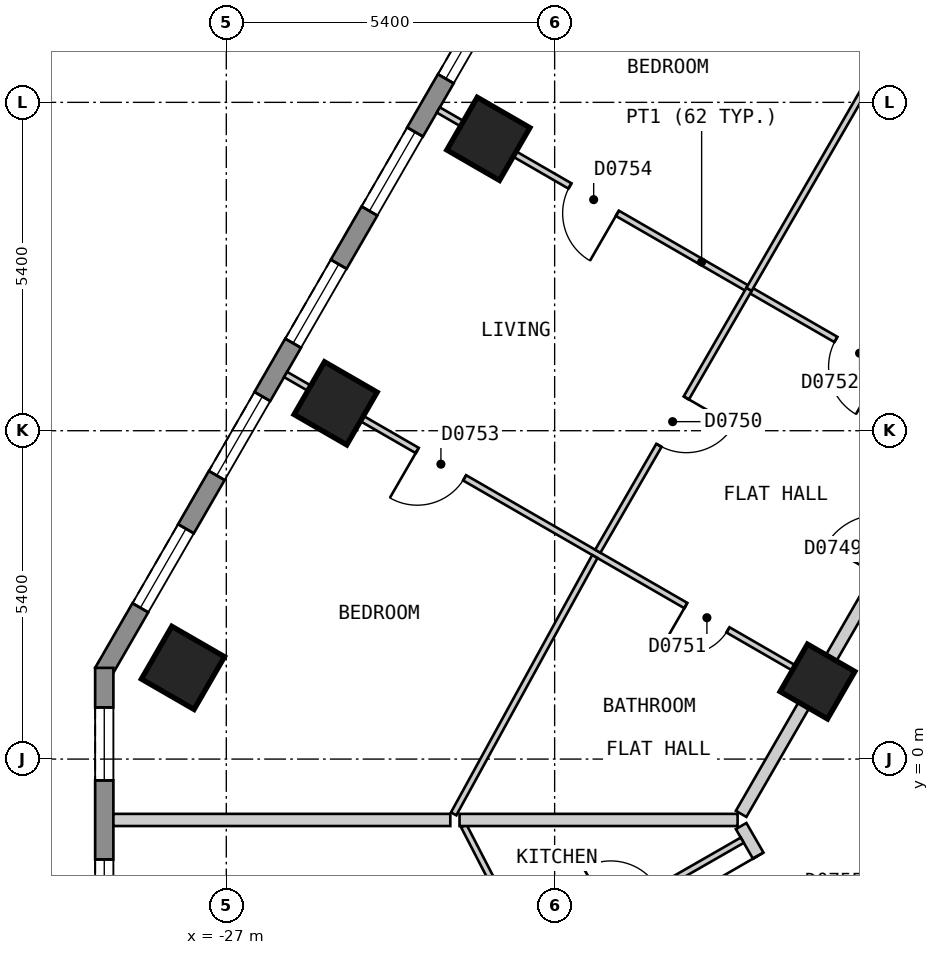
"""IFC4 building model, lengths in metres.
Left out: names, types, materials, properties, quantities, classifications, styles, units other than length and angle.
Written with IfcOpenShell. Run it as: python <this file> out.ifc"""

import sys

from ifc_helpers import new_model, si_unit, direction, frame, frame_2d, origin, origin_2d, place, context, subcontext, project, spatial, polyline, rectangle, outline, extrude, element, fill, save


model = new_model("IFC4")
c1 = context("Model", 3, precision=1e-05, world=origin(), true_north=direction((0.0, 1.0)))
c2 = subcontext(c1, "Body", "Model", "MODEL_VIEW")
j1 = project(units=[si_unit("LENGTHUNIT", "METRE"), si_unit("PLANEANGLEUNIT", "RADIAN")], contexts=[c1])
p1 = place(None, origin())
s1 = spatial("IfcSite", under=j1, at=p1, CompositionType="ELEMENT")
p2 = place(p1, origin())
s2 = spatial("IfcBuilding", under=s1, at=p2, CompositionType="ELEMENT")
p3 = place(p2, frame((0.0, 0.0, 105.0)))
s3 = spatial("IfcBuildingStorey", under=s2, at=p3, CompositionType="ELEMENT", Elevation=105.0)
for number, where, z_axis, x_axis in (
    (1, (-22.69, 10.2, 0.0), (0.0, 0.0, 1.0), (-0.5, -0.866, 0.0)),
    (2, (-25.202, 5.85, 0.0), (0.0, 0.0, 1.0), (-0.5, -0.866, 0.0)),
    (3, (-27.713, 1.5, 0.0), (0.0, 0.0, 1.0), (-0.5, -0.866, 0.0)),
):
    element("IfcColumn", number, at=place(p3, frame(where, z_axis=z_axis, x_axis=x_axis)), inside=s3, PredefinedType="COLUMN", context=c2, shape_type="SweptSolid", body=[
        extrude(rectangle(XDim=1.0, YDim=1.0, at=origin_2d()), origin(), (0.0, 0.0, 1.0), 3.0),
    ])
p4 = place(p3, frame((-17.277, 1.275, 0.0), z_axis=(0.0, 0.0, 1.0), x_axis=(-0.5, -0.866025403784, 0.0)))
e4 = element("IfcColumn", 4, at=p4, inside=s3, PredefinedType="COLUMN", context=c2, shape_type="SweptSolid", body=[
    extrude(rectangle(XDim=0.9, YDim=0.9, at=origin_2d()), origin(), (0.0, 0.0, 1.0), 3.0),
])
p5 = place(p3, frame((-15.747, 24.425, 0.0), z_axis=(0.0, 0.0, 1.0), x_axis=(-0.500027479704, -0.866009537788, 0.0)))
e5 = element("IfcWall", 5, at=p5, inside=s3, PredefinedType="SOLIDWALL", context=c2, shape_type="SweptSolid", body=[
    extrude(outline(polyline([(0.0, -0.15), (26.559, -0.15), (26.478, 0.15), (0.08, 0.15), (0.0, -0.15)])), origin(), (0.0, 0.0, 1.0), 2.6),
])
p6 = place(p5, frame((1.227, 0.0, 0.15)))
e6 = element("IfcOpeningElement", 6, at=p6, cuts=e5, PredefinedType="OPENING", context=c2, shape_type="SweptSolid", body=[
    extrude(rectangle(XDim=1.5, YDim=2.1, at=frame_2d((0.75, 1.05))), frame((0.0, 0.16, 0.0), z_axis=(0.0, -1.0, 0.0), x_axis=(1.0, 0.0, 0.0)), (0.0, 0.0, 1.0), 0.32),
])
p7 = place(p5, frame((3.739, 0.0, 0.15)))
e7 = element("IfcOpeningElement", 7, at=p7, cuts=e5, PredefinedType="OPENING", context=c2, shape_type="SweptSolid", body=[
    extrude(rectangle(XDim=1.5, YDim=2.1, at=frame_2d((0.75, 1.05))), frame((0.0, 0.16, 0.0), z_axis=(0.0, -1.0, 0.0), x_axis=(1.0, 0.0, 0.0)), (0.0, 0.0, 1.0), 0.32),
])
p8 = place(p5, frame((6.25, 0.0, 0.15)))
e8 = element("IfcOpeningElement", 8, at=p8, cuts=e5, PredefinedType="OPENING", context=c2, shape_type="SweptSolid", body=[
    extrude(rectangle(XDim=1.5, YDim=2.1, at=frame_2d((0.75, 1.05))), frame((0.0, 0.16, 0.0), z_axis=(0.0, -1.0, 0.0), x_axis=(1.0, 0.0, 0.0)), (0.0, 0.0, 1.0), 0.32),
])
p9 = place(p5, frame((8.761, 0.0, 0.15)))
e9 = element("IfcOpeningElement", 9, at=p9, cuts=e5, PredefinedType="OPENING", context=c2, shape_type="SweptSolid", body=[
    extrude(rectangle(XDim=1.5, YDim=2.1, at=frame_2d((0.75, 1.05))), frame((0.0, 0.16, 0.0), z_axis=(0.0, -1.0, 0.0), x_axis=(1.0, 0.0, 0.0)), (0.0, 0.0, 1.0), 0.32),
])
p10 = place(p5, frame((11.273, 0.0, 0.15)))
e10 = element("IfcOpeningElement", 10, at=p10, cuts=e5, PredefinedType="OPENING", context=c2, shape_type="SweptSolid", body=[
    extrude(rectangle(XDim=1.5, YDim=2.1, at=frame_2d((0.75, 1.05))), frame((0.0, 0.16, 0.0), z_axis=(0.0, -1.0, 0.0), x_axis=(1.0, 0.0, 0.0)), (0.0, 0.0, 1.0), 0.32),
])
p11 = place(p5, frame((13.785, 0.0, 0.15)))
e11 = element("IfcOpeningElement", 11, at=p11, cuts=e5, PredefinedType="OPENING", context=c2, shape_type="SweptSolid", body=[
    extrude(rectangle(XDim=1.5, YDim=2.1, at=frame_2d((0.75, 1.05))), frame((0.0, 0.16, 0.0), z_axis=(0.0, -1.0, 0.0), x_axis=(1.0, 0.0, 0.0)), (0.0, 0.0, 1.0), 0.32),
])
p12 = place(p5, frame((16.296, 0.0, 0.15)))
e12 = element("IfcOpeningElement", 12, at=p12, cuts=e5, PredefinedType="OPENING", context=c2, shape_type="SweptSolid", body=[
    extrude(rectangle(XDim=1.5, YDim=2.1, at=frame_2d((0.75, 1.05))), frame((0.0, 0.16, 0.0), z_axis=(0.0, -1.0, 0.0), x_axis=(1.0, 0.0, 0.0)), (0.0, 0.0, 1.0), 0.32),
])
p13 = place(p5, frame((18.807, 0.0, 0.15)))
e13 = element("IfcOpeningElement", 13, at=p13, cuts=e5, PredefinedType="OPENING", context=c2, shape_type="SweptSolid", body=[
    extrude(rectangle(XDim=1.5, YDim=2.1, at=frame_2d((0.75, 1.05))), frame((0.0, 0.16, 0.0), z_axis=(0.0, -1.0, 0.0), x_axis=(1.0, 0.0, 0.0)), (0.0, 0.0, 1.0), 0.32),
])
p14 = place(p5, frame((21.319, 0.0, 0.15)))
e14 = element("IfcOpeningElement", 14, at=p14, cuts=e5, PredefinedType="OPENING", context=c2, shape_type="SweptSolid", body=[
    extrude(rectangle(XDim=1.5, YDim=2.1, at=frame_2d((0.75, 1.05))), frame((0.0, 0.16, 0.0), z_axis=(0.0, -1.0, 0.0), x_axis=(1.0, 0.0, 0.0)), (0.0, 0.0, 1.0), 0.32),
])
p15 = place(p5, frame((23.831, 0.0, 0.15)))
e15 = element("IfcOpeningElement", 15, at=p15, cuts=e5, PredefinedType="OPENING", context=c2, shape_type="SweptSolid", body=[
    extrude(rectangle(XDim=1.5, YDim=2.1, at=frame_2d((0.75, 1.05))), frame((0.0, 0.16, 0.0), z_axis=(0.0, -1.0, 0.0), x_axis=(1.0, 0.0, 0.0)), (0.0, 0.0, 1.0), 0.32),
])
p16 = place(p3, frame((-29.007, 1.5, 0.0), z_axis=(0.0, 0.0, 1.0), x_axis=(0.0, -1.0, 0.0)))
e16 = element("IfcWall", 16, at=p16, inside=s3, PredefinedType="SOLIDWALL", context=c2, shape_type="SweptSolid", body=[
    extrude(outline(polyline([(0.0, -0.15), (5.0, -0.15), (4.92, 0.15), (0.08, 0.15), (0.0, -0.15)])), origin(), (0.0, 0.0, 1.0), 2.6),
])
p17 = place(p16, frame((0.65, 0.0, 0.15)))
e17 = element("IfcOpeningElement", 17, at=p17, cuts=e16, PredefinedType="OPENING", context=c2, shape_type="SweptSolid", body=[
    extrude(rectangle(XDim=1.2, YDim=2.1, at=frame_2d((0.6, 1.05))), frame((0.0, 0.16, 0.0), z_axis=(0.0, -1.0, 0.0), x_axis=(1.0, 0.0, 0.0)), (0.0, 0.0, 1.0), 0.32),
])
p18 = place(p16, frame((3.15, 0.0, 0.15)))
e18 = element("IfcOpeningElement", 18, at=p18, cuts=e16, PredefinedType="OPENING", context=c2, shape_type="SweptSolid", body=[
    extrude(rectangle(XDim=1.2, YDim=2.1, at=frame_2d((0.6, 1.05))), frame((0.0, 0.16, 0.0), z_axis=(0.0, -1.0, 0.0), x_axis=(1.0, 0.0, 0.0)), (0.0, 0.0, 1.0), 0.32),
])
p19 = place(p3, frame((-18.533, -1.101, 0.0), z_axis=(0.0, 0.0, 1.0), x_axis=(0.500135180047, -0.865947343479, 0.0)))
e19 = element("IfcWall", 19, at=p19, inside=s3, PredefinedType="PARTITIONING", context=c2, shape_type="SweptSolid", body=[
    extrude(rectangle(XDim=2.799, YDim=0.2, at=frame_2d((1.399, 0.0))), origin(), (0.0, 0.0, 1.0), 2.6),
])
p20 = place(p19, frame((0.562, 0.0, 0.0)))
e20 = element("IfcOpeningElement", 20, at=p20, cuts=e19, PredefinedType="OPENING", context=c2, shape_type="SweptSolid", body=[
    extrude(rectangle(XDim=1.0, YDim=2.1, at=frame_2d((0.5, 1.05))), frame((0.0, 0.11, 0.0), z_axis=(0.0, -1.0, 0.0), x_axis=(1.0, 0.0, 0.0)), (0.0, 0.0, 1.0), 0.22),
])
p21 = place(p3, frame((-18.533, -0.901, 0.0), z_axis=(0.0, 0.0, 1.0), x_axis=(0.499981198768, 0.866036258409, 0.0)))
e21 = element("IfcWall", 21, at=p21, inside=s3, PredefinedType="PARTITIONING", context=c2, shape_type="SweptSolid", body=[
    extrude(rectangle(XDim=20.093, YDim=0.2, at=frame_2d((10.046, 0.0))), origin(), (0.0, 0.0, 1.0), 2.6),
])
p22 = place(p21, frame((14.57, 0.0, 0.0)))
e22 = element("IfcOpeningElement", 22, at=p22, cuts=e21, PredefinedType="OPENING", context=c2, shape_type="SweptSolid", body=[
    extrude(rectangle(XDim=1.0, YDim=2.1, at=frame_2d((0.5, 1.05))), frame((0.0, 0.11, 0.0), z_axis=(0.0, -1.0, 0.0), x_axis=(1.0, 0.0, 0.0)), (0.0, 0.0, 1.0), 0.22),
])
p23 = place(p21, frame((4.523, 0.0, 0.0)))
e23 = element("IfcOpeningElement", 23, at=p23, cuts=e21, PredefinedType="OPENING", context=c2, shape_type="SweptSolid", body=[
    extrude(rectangle(XDim=1.0, YDim=2.1, at=frame_2d((0.5, 1.05))), frame((0.0, 0.11, 0.0), z_axis=(0.0, -1.0, 0.0), x_axis=(1.0, 0.0, 0.0)), (0.0, 0.0, 1.0), 0.22),
])
p24 = place(p3, frame((-23.093, -1.101, 0.0), z_axis=(0.0, 0.0, 1.0), x_axis=(0.459171814268, -0.888347479865, 0.0)))
e24 = element("IfcWall", 24, at=p24, inside=s3, PredefinedType="PARTITIONING", context=c2, shape_type="SweptSolid", body=[
    extrude(rectangle(XDim=2.01, YDim=0.1, at=frame_2d((1.005, 0.0))), origin(), (0.0, 0.0, 1.0), 2.6),
])
p25 = place(p3, frame((-26.025, 6.325, 0.0), z_axis=(0.0, 0.0, 1.0), x_axis=(0.866041268327, -0.499972520799, 0.0)))
e25 = element("IfcWall", 25, at=p25, inside=s3, PredefinedType="PARTITIONING", context=c2, shape_type="SweptSolid", body=[
    extrude(rectangle(XDim=10.0, YDim=0.1, at=frame_2d((5.0, 0.0))), origin(), (0.0, 0.0, 1.0), 2.6),
])
p26 = place(p25, frame((7.601, 0.0, 0.0)))
e26 = element("IfcOpeningElement", 26, at=p26, cuts=e25, PredefinedType="OPENING", context=c2, shape_type="SweptSolid", body=[
    extrude(rectangle(XDim=0.8, YDim=2.1, at=frame_2d((0.4, 1.05))), frame((0.0, 0.06, 0.0), z_axis=(0.0, -1.0, 0.0), x_axis=(1.0, 0.0, 0.0)), (0.0, 0.0, 1.0), 0.12),
])
p27 = place(p25, frame((2.5, 0.0, 0.0)))
e27 = element("IfcOpeningElement", 27, at=p27, cuts=e25, PredefinedType="OPENING", context=c2, shape_type="SweptSolid", body=[
    extrude(rectangle(XDim=0.9, YDim=2.1, at=frame_2d((0.45, 1.05))), frame((0.0, 0.06, 0.0), z_axis=(0.0, -1.0, 0.0), x_axis=(1.0, 0.0, 0.0)), (0.0, 0.0, 1.0), 0.12),
])
p28 = place(p3, frame((-23.513, 10.675, 0.0), z_axis=(0.0, 0.0, 1.0), x_axis=(0.866041268327, -0.499972520799, 0.0)))
e28 = element("IfcWall", 28, at=p28, inside=s3, PredefinedType="PARTITIONING", context=c2, shape_type="SweptSolid", body=[
    extrude(rectangle(XDim=10.0, YDim=0.1, at=frame_2d((5.0, 0.0))), origin(), (0.0, 0.0, 1.0), 2.6),
])
p29 = place(p28, frame((7.55, 0.0, 0.0)))
e29 = element("IfcOpeningElement", 29, at=p29, cuts=e28, PredefinedType="OPENING", context=c2, shape_type="SweptSolid", body=[
    extrude(rectangle(XDim=0.9, YDim=2.1, at=frame_2d((0.45, 1.05))), frame((0.0, 0.06, 0.0), z_axis=(0.0, -1.0, 0.0), x_axis=(1.0, 0.0, 0.0)), (0.0, 0.0, 1.0), 0.12),
])
p30 = place(p28, frame((2.5, 0.0, 0.0)))
e30 = element("IfcOpeningElement", 30, at=p30, cuts=e28, PredefinedType="OPENING", context=c2, shape_type="SweptSolid", body=[
    extrude(rectangle(XDim=0.9, YDim=2.1, at=frame_2d((0.45, 1.05))), frame((0.0, 0.06, 0.0), z_axis=(0.0, -1.0, 0.0), x_axis=(1.0, 0.0, 0.0)), (0.0, 0.0, 1.0), 0.12),
])
p31 = place(p3, frame((-20.89, 3.418, 0.0), z_axis=(0.0, 0.0, 1.0), x_axis=(0.500014231302, 0.866017187182, 0.0)))
e31 = element("IfcWall", 31, at=p31, inside=s3, PredefinedType="PARTITIONING", context=c2, shape_type="SweptSolid", body=[
    extrude(rectangle(XDim=4.973, YDim=0.1, at=frame_2d((2.487, 0.0))), origin(), (0.0, 0.0, 1.0), 2.6),
])
p32 = place(p31, frame((2.011, 0.0, 0.0)))
e32 = element("IfcOpeningElement", 32, at=p32, cuts=e31, PredefinedType="OPENING", context=c2, shape_type="SweptSolid", body=[
    extrude(rectangle(XDim=0.9, YDim=2.1, at=frame_2d((0.45, 1.05))), frame((0.0, 0.06, 0.0), z_axis=(0.0, -1.0, 0.0), x_axis=(1.0, 0.0, 0.0)), (0.0, 0.0, 1.0), 0.12),
])
p33 = place(p3, frame((-23.261, -0.901, 0.0), z_axis=(0.0, 0.0, 1.0), x_axis=(0.481037050261, 0.876700265927, 0.0)))
e33 = element("IfcWall", 33, at=p33, inside=s3, PredefinedType="PARTITIONING", context=c2, shape_type="SweptSolid", body=[
    extrude(rectangle(XDim=4.827, YDim=0.1, at=frame_2d((2.414, 0.0))), origin(), (0.0, 0.0, 1.0), 2.6),
])
p34 = place(p3, frame((-22.094, -3.388, 0.0), z_axis=(0.0, 0.0, 1.0), x_axis=(0.867386440944, 0.497635169644, 0.0)))
e34 = element("IfcWall", 34, at=p34, inside=s3, PredefinedType="PARTITIONING", context=c2, shape_type="SweptSolid", body=[
    extrude(rectangle(XDim=4.127, YDim=0.1, at=frame_2d((2.064, 0.0))), origin(), (0.0, 0.0, 1.0), 2.6),
])
p35 = place(p34, frame((1.634, 0.0, 0.0)))
e35 = element("IfcOpeningElement", 35, at=p35, cuts=e34, PredefinedType="OPENING", context=c2, shape_type="SweptSolid", body=[
    extrude(rectangle(XDim=0.9, YDim=2.1, at=frame_2d((0.45, 1.05))), frame((0.0, 0.06, 0.0), z_axis=(0.0, -1.0, 0.0), x_axis=(1.0, 0.0, 0.0)), (0.0, 0.0, 1.0), 0.12),
])
p36 = place(p3, frame((-28.857, -1.001, 0.0), z_axis=(0.0, 0.0, 1.0), x_axis=(1.0, 0.0, 0.0)))
e36 = element("IfcWall", 36, at=p36, inside=s3, PredefinedType="PARTITIONING", context=c2, shape_type="SweptSolid", body=[
    extrude(rectangle(XDim=5.541, YDim=0.2, at=frame_2d((2.771, 0.0))), origin(), (0.0, 0.0, 1.0), 2.6),
])
p37 = place(p3, frame((-23.164, -1.001, 0.0), z_axis=(0.0, 0.0, 1.0), x_axis=(1.0, 0.0, 0.0)))
e37 = element("IfcWall", 37, at=p37, inside=s3, PredefinedType="PARTITIONING", context=c2, shape_type="SweptSolid", body=[
    extrude(rectangle(XDim=4.573, YDim=0.2, at=frame_2d((2.287, 0.0))), origin(), (0.0, 0.0, 1.0), 2.6),
])
p38 = place(p3, frame((-18.403, 7.725, 0.0), z_axis=(0.0, 0.0, 1.0), x_axis=(0.499995794706, 0.866027831699, 0.0)))
e38 = element("IfcWall", 38, at=p38, inside=s3, PredefinedType="PARTITIONING", context=c2, shape_type="SweptSolid", body=[
    extrude(rectangle(XDim=4.922, YDim=0.1, at=frame_2d((2.461, 0.0))), origin(), (0.0, 0.0, 1.0), 2.6),
])
p39 = place(p11, origin())
e39 = element("IfcWindow", 39, at=p39, inside=s3, PartitioningType="SINGLE_PANEL", PredefinedType="WINDOW", context=c2, shape_type="SweptSolid", body=[
    extrude(rectangle(XDim=1.5, YDim=2.1, at=frame_2d((0.75, 1.05))), frame((0.0, 0.03, 0.0), z_axis=(0.0, -1.0, 0.0), x_axis=(1.0, 0.0, 0.0)), (0.0, 0.0, 1.0), 0.06),
])
fill(e11, e39)
p40 = place(p12, origin())
e40 = element("IfcWindow", 40, at=p40, inside=s3, PartitioningType="SINGLE_PANEL", PredefinedType="WINDOW", context=c2, shape_type="SweptSolid", body=[
    extrude(rectangle(XDim=1.5, YDim=2.1, at=frame_2d((0.75, 1.05))), frame((0.0, 0.03, 0.0), z_axis=(0.0, -1.0, 0.0), x_axis=(1.0, 0.0, 0.0)), (0.0, 0.0, 1.0), 0.06),
])
fill(e12, e40)
p41 = place(p13, origin())
e41 = element("IfcWindow", 41, at=p41, inside=s3, PartitioningType="SINGLE_PANEL", PredefinedType="WINDOW", context=c2, shape_type="SweptSolid", body=[
    extrude(rectangle(XDim=1.5, YDim=2.1, at=frame_2d((0.75, 1.05))), frame((0.0, 0.03, 0.0), z_axis=(0.0, -1.0, 0.0), x_axis=(1.0, 0.0, 0.0)), (0.0, 0.0, 1.0), 0.06),
])
fill(e13, e41)
p42 = place(p14, origin())
e42 = element("IfcWindow", 42, at=p42, inside=s3, PartitioningType="SINGLE_PANEL", PredefinedType="WINDOW", context=c2, shape_type="SweptSolid", body=[
    extrude(rectangle(XDim=1.5, YDim=2.1, at=frame_2d((0.75, 1.05))), frame((0.0, 0.03, 0.0), z_axis=(0.0, -1.0, 0.0), x_axis=(1.0, 0.0, 0.0)), (0.0, 0.0, 1.0), 0.06),
])
fill(e14, e42)
p43 = place(p15, origin())
e43 = element("IfcWindow", 43, at=p43, inside=s3, PartitioningType="SINGLE_PANEL", PredefinedType="WINDOW", context=c2, shape_type="SweptSolid", body=[
    extrude(rectangle(XDim=1.5, YDim=2.1, at=frame_2d((0.75, 1.05))), frame((0.0, 0.03, 0.0), z_axis=(0.0, -1.0, 0.0), x_axis=(1.0, 0.0, 0.0)), (0.0, 0.0, 1.0), 0.06),
])
fill(e15, e43)
p44 = place(p17, origin())
e44 = element("IfcWindow", 44, at=p44, inside=s3, PartitioningType="SINGLE_PANEL", PredefinedType="WINDOW", context=c2, shape_type="SweptSolid", body=[
    extrude(rectangle(XDim=1.2, YDim=2.1, at=frame_2d((0.6, 1.05))), frame((0.0, 0.03, 0.0), z_axis=(0.0, -1.0, 0.0), x_axis=(1.0, 0.0, 0.0)), (0.0, 0.0, 1.0), 0.06),
])
fill(e17, e44)
p45 = place(p18, origin())
e45 = element("IfcWindow", 45, at=p45, inside=s3, PartitioningType="SINGLE_PANEL", PredefinedType="WINDOW", context=c2, shape_type="SweptSolid", body=[
    extrude(rectangle(XDim=1.2, YDim=2.1, at=frame_2d((0.6, 1.05))), frame((0.0, 0.03, 0.0), z_axis=(0.0, -1.0, 0.0), x_axis=(1.0, 0.0, 0.0)), (0.0, 0.0, 1.0), 0.06),
])
fill(e18, e45)
p46 = place(p32, origin())
e46 = element("IfcDoor", 46, at=p46, inside=s3, OperationType="SINGLE_SWING_RIGHT", PredefinedType="DOOR", context=c2, shape_type="SweptSolid", body=[
    extrude(rectangle(XDim=0.9, YDim=2.1, at=frame_2d((0.45, 1.05))), frame((0.0, 0.025, 0.0), z_axis=(0.0, -1.0, 0.0), x_axis=(1.0, 0.0, 0.0)), (0.0, 0.0, 1.0), 0.05),
])
fill(e32, e46)
p47 = place(p26, origin())
e47 = element("IfcDoor", 47, at=p47, inside=s3, OperationType="SINGLE_SWING_LEFT", PredefinedType="DOOR", context=c2, shape_type="SweptSolid", body=[
    extrude(rectangle(XDim=0.8, YDim=2.1, at=frame_2d((0.4, 1.05))), frame((0.0, 0.025, 0.0), z_axis=(0.0, -1.0, 0.0), x_axis=(1.0, 0.0, 0.0)), (0.0, 0.0, 1.0), 0.05),
])
fill(e26, e47)
p48 = place(p29, origin())
e48 = element("IfcDoor", 48, at=p48, inside=s3, OperationType="SINGLE_SWING_RIGHT", PredefinedType="DOOR", context=c2, shape_type="SweptSolid", body=[
    extrude(rectangle(XDim=0.9, YDim=2.1, at=frame_2d((0.45, 1.05))), frame((0.0, 0.025, 0.0), z_axis=(0.0, -1.0, 0.0), x_axis=(1.0, 0.0, 0.0)), (0.0, 0.0, 1.0), 0.05),
])
fill(e29, e48)
p49 = place(p27, origin())
e49 = element("IfcDoor", 49, at=p49, inside=s3, OperationType="SINGLE_SWING_LEFT", PredefinedType="DOOR", context=c2, shape_type="SweptSolid", body=[
    extrude(rectangle(XDim=0.9, YDim=2.1, at=frame_2d((0.45, 1.05))), frame((0.0, 0.025, 0.0), z_axis=(0.0, -1.0, 0.0), x_axis=(1.0, 0.0, 0.0)), (0.0, 0.0, 1.0), 0.05),
])
fill(e27, e49)
p50 = place(p30, origin())
e50 = element("IfcDoor", 50, at=p50, inside=s3, OperationType="SINGLE_SWING_RIGHT", PredefinedType="DOOR", context=c2, shape_type="SweptSolid", body=[
    extrude(rectangle(XDim=0.9, YDim=2.1, at=frame_2d((0.45, 1.05))), frame((0.0, 0.025, 0.0), z_axis=(0.0, -1.0, 0.0), x_axis=(1.0, 0.0, 0.0)), (0.0, 0.0, 1.0), 0.05),
])
fill(e30, e50)
p51 = place(p20, origin())
e51 = element("IfcDoor", 51, at=p51, inside=s3, OperationType="SINGLE_SWING_LEFT", PredefinedType="DOOR", context=c2, shape_type="SweptSolid", body=[
    extrude(rectangle(XDim=1.0, YDim=2.1, at=frame_2d((0.5, 1.05))), frame((0.0, 0.025, 0.0), z_axis=(0.0, -1.0, 0.0), x_axis=(1.0, 0.0, 0.0)), (0.0, 0.0, 1.0), 0.05),
])
fill(e20, e51)
save(model, sys.argv[1])
